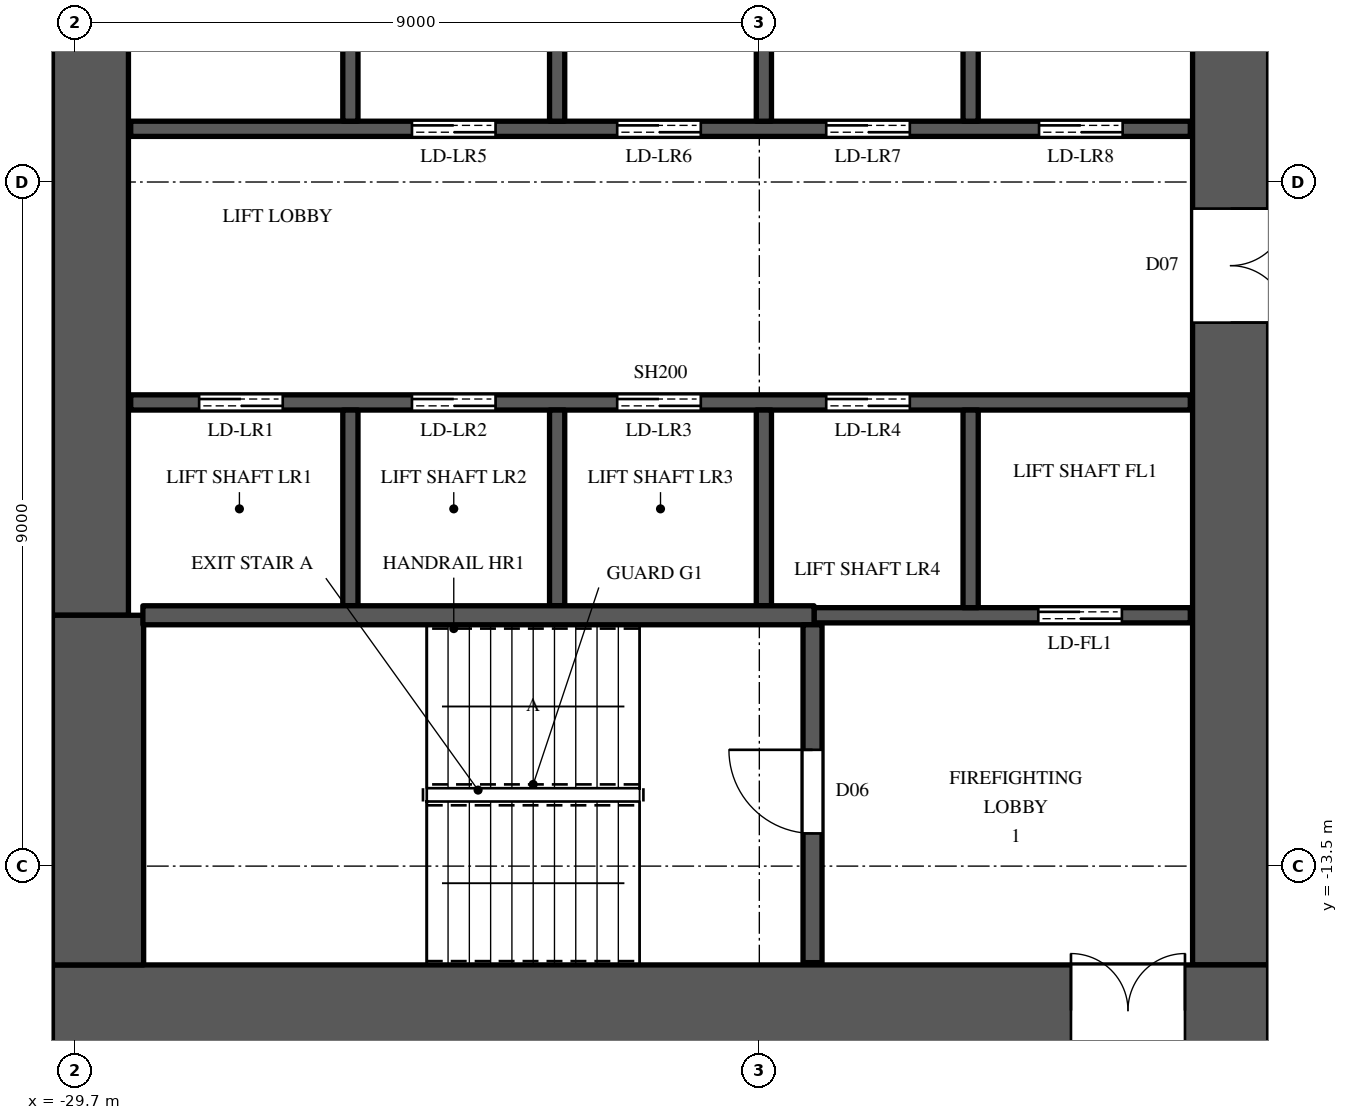
"""IFC4 building model, lengths in metres.
Left out: names, types, materials, properties, quantities, classifications, styles, units other than length and angle.
Written with IfcOpenShell. Run it as: python <this file> out.ifc"""

import sys

from ifc_helpers import new_model, si_unit, direction, frame, frame_2d, origin, place, context, subcontext, project, spatial, rectangle, extrude, element, fill, save


model = new_model("IFC4")
c1 = context("Model", 3, precision=1e-05, world=origin(), true_north=direction((0.0, 1.0)))
c2 = subcontext(c1, "Body", "Model", "MODEL_VIEW")
j1 = project(units=[si_unit("LENGTHUNIT", "METRE"), si_unit("PLANEANGLEUNIT", "RADIAN")], contexts=[c1])
p1 = place(None, origin())
s1 = spatial("IfcSite", under=j1, at=p1, CompositionType="ELEMENT")
p2 = place(p1, origin())
s2 = spatial("IfcBuilding", under=s1, at=p2, CompositionType="ELEMENT")
p3 = place(p2, frame((0.0, 0.0, 66.3)))
s3 = spatial("IfcBuildingStorey", under=s2, at=p3, CompositionType="ELEMENT", Elevation=66.3)
p4 = place(p3, frame((-30.0, -15.4, 0.0), z_axis=(0.0, 0.0, 1.0), x_axis=(1.0, 0.0, 0.0)))
e1 = element("IfcWall", 1, at=p4, inside=s3, PredefinedType="SHEAR", context=c2, shape_type="SweptSolid", body=[
    extrude(rectangle(XDim=16.0, YDim=1.2, at=frame_2d((8.0, 0.0))), origin(), (0.0, 0.0, 1.0), 3.6),
])
p5 = place(p4, frame((13.4, 0.0, 0.0)))
e2 = element("IfcOpeningElement", 2, at=p5, cuts=e1, PredefinedType="OPENING", context=c2, shape_type="SweptSolid", body=[
    extrude(rectangle(XDim=1.5, YDim=2.4, at=frame_2d((0.75, 1.2))), frame((0.0, 0.61, 0.0), z_axis=(0.0, -1.0, 0.0), x_axis=(1.0, 0.0, 0.0)), (0.0, 0.0, 1.0), 1.22),
])
p6 = place(p3, frame((-14.5, -14.8, 0.0), z_axis=(0.0, 0.0, 1.0), x_axis=(0.0, 1.0, 0.0)))
e3 = element("IfcWall", 3, at=p6, inside=s3, PredefinedType="SHEAR", context=c2, shape_type="SweptSolid", body=[
    extrude(rectangle(XDim=29.6, YDim=1.0, at=frame_2d((14.8, 0.0))), origin(), (0.0, 0.0, 1.0), 3.6),
])
p7 = place(p6, frame((8.45, 0.0, 0.0)))
e4 = element("IfcOpeningElement", 4, at=p7, cuts=e3, PredefinedType="OPENING", context=c2, shape_type="SweptSolid", body=[
    extrude(rectangle(XDim=1.5, YDim=2.4, at=frame_2d((0.75, 1.2))), frame((0.0, 0.51, 0.0), z_axis=(0.0, -1.0, 0.0), x_axis=(1.0, 0.0, 0.0)), (0.0, 0.0, 1.0), 1.02),
])
p8 = place(p6, frame((19.65, 0.0, 0.0)))
e5 = element("IfcOpeningElement", 5, at=p8, cuts=e3, PredefinedType="OPENING", context=c2, shape_type="SweptSolid", body=[
    extrude(rectangle(XDim=1.5, YDim=2.4, at=frame_2d((0.75, 1.2))), frame((0.0, 0.51, 0.0), z_axis=(0.0, -1.0, 0.0), x_axis=(1.0, 0.0, 0.0)), (0.0, 0.0, 1.0), 1.02),
])
p9 = place(p6, frame((14.5, 0.0, 0.0)))
e6 = element("IfcOpeningElement", 6, at=p9, cuts=e3, PredefinedType="OPENING", context=c2, shape_type="SweptSolid", body=[
    extrude(rectangle(XDim=0.6, YDim=2.0, at=frame_2d((0.3, 1.0))), frame((0.0, 0.51, 0.0), z_axis=(0.0, -1.0, 0.0), x_axis=(1.0, 0.0, 0.0)), (0.0, 0.0, 1.0), 1.02),
])
p10 = place(p3, frame((-29.5, -10.2, 0.0), z_axis=(0.0, 0.0, 1.0), x_axis=(0.0, 1.0, 0.0)))
e7 = element("IfcWall", 7, at=p10, inside=s3, PredefinedType="SHEAR", context=c2, shape_type="SweptSolid", body=[
    extrude(rectangle(XDim=20.4, YDim=1.0, at=frame_2d((10.2, 0.0))), origin(), (0.0, 0.0, 1.0), 3.6),
])
p11 = place(p3, frame((-29.4, -14.8, 0.0), z_axis=(0.0, 0.0, 1.0), x_axis=(0.0, 1.0, 0.0)))
e8 = element("IfcWall", 8, at=p11, inside=s3, PredefinedType="SHEAR", context=c2, shape_type="SweptSolid", body=[
    extrude(rectangle(XDim=4.6, YDim=1.2, at=frame_2d((2.3, 0.0))), origin(), (0.0, 0.0, 1.0), 3.6),
])
p12 = place(p3, frame((-28.97, -7.4, 0.0), z_axis=(0.0, 0.0, 1.0), x_axis=(1.0, 0.0, 0.0)))
e9 = element("IfcWall", 9, at=p12, inside=s3, PredefinedType="SHEAR", context=c2, shape_type="SweptSolid", body=[
    extrude(rectangle(XDim=13.94, YDim=0.2, at=frame_2d((6.97, 0.0))), origin(), (0.0, 0.0, 1.0), 3.3),
])
p13 = place(p12, frame((0.9, 0.0, 0.0)))
e10 = element("IfcOpeningElement", 10, at=p13, cuts=e9, PredefinedType="OPENING", context=c2, shape_type="SweptSolid", body=[
    extrude(rectangle(XDim=1.1, YDim=2.2, at=frame_2d((0.55, 1.1))), frame((0.0, 0.11, 0.0), z_axis=(0.0, -1.0, 0.0), x_axis=(1.0, 0.0, 0.0)), (0.0, 0.0, 1.0), 0.22),
])
p14 = place(p12, frame((3.7, 0.0, 0.0)))
e11 = element("IfcOpeningElement", 11, at=p14, cuts=e9, PredefinedType="OPENING", context=c2, shape_type="SweptSolid", body=[
    extrude(rectangle(XDim=1.1, YDim=2.2, at=frame_2d((0.55, 1.1))), frame((0.0, 0.11, 0.0), z_axis=(0.0, -1.0, 0.0), x_axis=(1.0, 0.0, 0.0)), (0.0, 0.0, 1.0), 0.22),
])
p15 = place(p12, frame((6.4, 0.0, 0.0)))
e12 = element("IfcOpeningElement", 12, at=p15, cuts=e9, PredefinedType="OPENING", context=c2, shape_type="SweptSolid", body=[
    extrude(rectangle(XDim=1.1, YDim=2.2, at=frame_2d((0.55, 1.1))), frame((0.0, 0.11, 0.0), z_axis=(0.0, -1.0, 0.0), x_axis=(1.0, 0.0, 0.0)), (0.0, 0.0, 1.0), 0.22),
])
p16 = place(p12, frame((9.15, 0.0, 0.0)))
e13 = element("IfcOpeningElement", 13, at=p16, cuts=e9, PredefinedType="OPENING", context=c2, shape_type="SweptSolid", body=[
    extrude(rectangle(XDim=1.1, YDim=2.2, at=frame_2d((0.55, 1.1))), frame((0.0, 0.11, 0.0), z_axis=(0.0, -1.0, 0.0), x_axis=(1.0, 0.0, 0.0)), (0.0, 0.0, 1.0), 0.22),
])
p17 = place(p3, frame((-28.97, -3.8, 0.0), z_axis=(0.0, 0.0, 1.0), x_axis=(1.0, 0.0, 0.0)))
e14 = element("IfcWall", 14, at=p17, inside=s3, PredefinedType="SHEAR", context=c2, shape_type="SweptSolid", body=[
    extrude(rectangle(XDim=13.94, YDim=0.2, at=frame_2d((6.97, 0.0))), origin(), (0.0, 0.0, 1.0), 3.3),
])
p18 = place(p17, frame((3.7, 0.0, 0.0)))
e15 = element("IfcOpeningElement", 15, at=p18, cuts=e14, PredefinedType="OPENING", context=c2, shape_type="SweptSolid", body=[
    extrude(rectangle(XDim=1.1, YDim=2.2, at=frame_2d((0.55, 1.1))), frame((0.0, 0.11, 0.0), z_axis=(0.0, -1.0, 0.0), x_axis=(1.0, 0.0, 0.0)), (0.0, 0.0, 1.0), 0.22),
])
p19 = place(p17, frame((6.4, 0.0, 0.0)))
e16 = element("IfcOpeningElement", 16, at=p19, cuts=e14, PredefinedType="OPENING", context=c2, shape_type="SweptSolid", body=[
    extrude(rectangle(XDim=1.1, YDim=2.2, at=frame_2d((0.55, 1.1))), frame((0.0, 0.11, 0.0), z_axis=(0.0, -1.0, 0.0), x_axis=(1.0, 0.0, 0.0)), (0.0, 0.0, 1.0), 0.22),
])
p20 = place(p17, frame((9.15, 0.0, 0.0)))
e17 = element("IfcOpeningElement", 17, at=p20, cuts=e14, PredefinedType="OPENING", context=c2, shape_type="SweptSolid", body=[
    extrude(rectangle(XDim=1.1, YDim=2.2, at=frame_2d((0.55, 1.1))), frame((0.0, 0.11, 0.0), z_axis=(0.0, -1.0, 0.0), x_axis=(1.0, 0.0, 0.0)), (0.0, 0.0, 1.0), 0.22),
])
p21 = place(p17, frame((11.95, 0.0, 0.0)))
e18 = element("IfcOpeningElement", 18, at=p21, cuts=e14, PredefinedType="OPENING", context=c2, shape_type="SweptSolid", body=[
    extrude(rectangle(XDim=1.1, YDim=2.2, at=frame_2d((0.55, 1.1))), frame((0.0, 0.11, 0.0), z_axis=(0.0, -1.0, 0.0), x_axis=(1.0, 0.0, 0.0)), (0.0, 0.0, 1.0), 0.22),
])
p22 = place(p3, frame((-26.08, -10.075, 0.0), z_axis=(0.0, 0.0, 1.0), x_axis=(0.0, 1.0, 0.0)))
e19 = element("IfcWall", 19, at=p22, inside=s3, PredefinedType="SHEAR", context=c2, shape_type="SweptSolid", body=[
    extrude(rectangle(XDim=2.575, YDim=0.2, at=frame_2d((1.288, 0.0))), origin(), (0.0, 0.0, 1.0), 3.6),
])
p23 = place(p3, frame((-26.08, -3.7, 0.0), z_axis=(0.0, 0.0, 1.0), x_axis=(0.0, 1.0, 0.0)))
e20 = element("IfcWall", 20, at=p23, inside=s3, PredefinedType="SHEAR", context=c2, shape_type="SweptSolid", body=[
    extrude(rectangle(XDim=2.6, YDim=0.2, at=frame_2d((1.3, 0.0))), origin(), (0.0, 0.0, 1.0), 3.6),
])
p24 = place(p3, frame((-23.36, -10.075, 0.0), z_axis=(0.0, 0.0, 1.0), x_axis=(0.0, 1.0, 0.0)))
e21 = element("IfcWall", 21, at=p24, inside=s3, PredefinedType="SHEAR", context=c2, shape_type="SweptSolid", body=[
    extrude(rectangle(XDim=2.575, YDim=0.2, at=frame_2d((1.288, 0.0))), origin(), (0.0, 0.0, 1.0), 3.6),
])
p25 = place(p3, frame((-23.36, -3.7, 0.0), z_axis=(0.0, 0.0, 1.0), x_axis=(0.0, 1.0, 0.0)))
e22 = element("IfcWall", 22, at=p25, inside=s3, PredefinedType="SHEAR", context=c2, shape_type="SweptSolid", body=[
    extrude(rectangle(XDim=2.6, YDim=0.2, at=frame_2d((1.3, 0.0))), origin(), (0.0, 0.0, 1.0), 3.6),
])
p26 = place(p3, frame((-20.64, -10.075, 0.0), z_axis=(0.0, 0.0, 1.0), x_axis=(0.0, 1.0, 0.0)))
e23 = element("IfcWall", 23, at=p26, inside=s3, PredefinedType="SHEAR", context=c2, shape_type="SweptSolid", body=[
    extrude(rectangle(XDim=2.575, YDim=0.2, at=frame_2d((1.288, 0.0))), origin(), (0.0, 0.0, 1.0), 3.6),
])
p27 = place(p3, frame((-20.64, -3.7, 0.0), z_axis=(0.0, 0.0, 1.0), x_axis=(0.0, 1.0, 0.0)))
e24 = element("IfcWall", 24, at=p27, inside=s3, PredefinedType="SHEAR", context=c2, shape_type="SweptSolid", body=[
    extrude(rectangle(XDim=2.6, YDim=0.2, at=frame_2d((1.3, 0.0))), origin(), (0.0, 0.0, 1.0), 3.6),
])
p28 = place(p3, frame((-19.98, -10.2, 0.0), z_axis=(0.0, 0.0, 1.0), x_axis=(1.0, 0.0, 0.0)))
e25 = element("IfcWall", 25, at=p28, inside=s3, PredefinedType="SHEAR", context=c2, shape_type="SweptSolid", body=[
    extrude(rectangle(XDim=4.95, YDim=0.2, at=frame_2d((2.475, 0.0))), origin(), (0.0, 0.0, 1.0), 3.3),
])
p29 = place(p28, frame((2.95, 0.0, 0.0)))
e26 = element("IfcOpeningElement", 26, at=p29, cuts=e25, PredefinedType="OPENING", context=c2, shape_type="SweptSolid", body=[
    extrude(rectangle(XDim=1.1, YDim=2.2, at=frame_2d((0.55, 1.1))), frame((0.0, 0.11, 0.0), z_axis=(0.0, -1.0, 0.0), x_axis=(1.0, 0.0, 0.0)), (0.0, 0.0, 1.0), 0.22),
])
p30 = place(p3, frame((-17.92, -10.1, 0.0), z_axis=(0.0, 0.0, 1.0), x_axis=(0.0, 1.0, 0.0)))
e27 = element("IfcWall", 27, at=p30, inside=s3, PredefinedType="SHEAR", context=c2, shape_type="SweptSolid", body=[
    extrude(rectangle(XDim=2.6, YDim=0.2, at=frame_2d((1.3, 0.0))), origin(), (0.0, 0.0, 1.0), 3.6),
])
p31 = place(p3, frame((-17.92, -3.7, 0.0), z_axis=(0.0, 0.0, 1.0), x_axis=(0.0, 1.0, 0.0)))
e28 = element("IfcWall", 28, at=p31, inside=s3, PredefinedType="SHEAR", context=c2, shape_type="SweptSolid", body=[
    extrude(rectangle(XDim=2.6, YDim=0.2, at=frame_2d((1.3, 0.0))), origin(), (0.0, 0.0, 1.0), 3.6),
])
p32 = place(p3, frame((-28.81, -10.2, 0.0), z_axis=(0.0, 0.0, 1.0), x_axis=(1.0, 0.0, 0.0)))
e29 = element("IfcWall", 29, at=p32, inside=s3, PredefinedType="SHEAR", context=c2, shape_type="SweptSolid", body=[
    extrude(rectangle(XDim=8.83, YDim=0.25, at=frame_2d((4.415, 0.0))), origin(), (0.0, 0.0, 1.0), 3.3),
])
p33 = place(p3, frame((-20.0, -14.77, 0.0), z_axis=(0.0, 0.0, 1.0), x_axis=(0.0, 1.0, 0.0)))
e30 = element("IfcWall", 30, at=p33, inside=s3, PredefinedType="SHEAR", context=c2, shape_type="SweptSolid", body=[
    extrude(rectangle(XDim=4.445, YDim=0.25, at=frame_2d((2.223, 0.0))), origin(), (0.0, 0.0, 1.0), 3.3),
])
p34 = place(p33, frame((1.7, 0.0, 0.0)))
e31 = element("IfcOpeningElement", 31, at=p34, cuts=e30, PredefinedType="OPENING", context=c2, shape_type="SweptSolid", body=[
    extrude(rectangle(XDim=1.1, YDim=2.2, at=frame_2d((0.55, 1.1))), frame((0.0, 0.135, 0.0), z_axis=(0.0, -1.0, 0.0), x_axis=(1.0, 0.0, 0.0)), (0.0, 0.0, 1.0), 0.27),
])
p35 = place(p34, origin())
e32 = element("IfcDoor", 32, at=p35, inside=s3, OperationType="SINGLE_SWING_RIGHT", PredefinedType="DOOR", context=c2, shape_type="SweptSolid", body=[
    extrude(rectangle(XDim=1.1, YDim=2.2, at=frame_2d((0.55, 1.1))), frame((0.0, 0.025, 0.0), z_axis=(0.0, -1.0, 0.0), x_axis=(1.0, 0.0, 0.0)), (0.0, 0.0, 1.0), 0.05),
])
fill(e31, e32)
p36 = place(p13, origin())
e33 = element("IfcDoor", 33, at=p36, inside=s3, OperationType="DOUBLE_DOOR_SLIDING", PredefinedType="DOOR", context=c2, shape_type="SweptSolid", body=[
    extrude(rectangle(XDim=1.1, YDim=2.2, at=frame_2d((0.55, 1.1))), frame((0.0, 0.025, 0.0), z_axis=(0.0, -1.0, 0.0), x_axis=(1.0, 0.0, 0.0)), (0.0, 0.0, 1.0), 0.05),
])
fill(e10, e33)
p37 = place(p14, origin())
e34 = element("IfcDoor", 34, at=p37, inside=s3, OperationType="DOUBLE_DOOR_SLIDING", PredefinedType="DOOR", context=c2, shape_type="SweptSolid", body=[
    extrude(rectangle(XDim=1.1, YDim=2.2, at=frame_2d((0.55, 1.1))), frame((0.0, 0.025, 0.0), z_axis=(0.0, -1.0, 0.0), x_axis=(1.0, 0.0, 0.0)), (0.0, 0.0, 1.0), 0.05),
])
fill(e11, e34)
p38 = place(p15, origin())
e35 = element("IfcDoor", 35, at=p38, inside=s3, OperationType="DOUBLE_DOOR_SLIDING", PredefinedType="DOOR", context=c2, shape_type="SweptSolid", body=[
    extrude(rectangle(XDim=1.1, YDim=2.2, at=frame_2d((0.55, 1.1))), frame((0.0, 0.025, 0.0), z_axis=(0.0, -1.0, 0.0), x_axis=(1.0, 0.0, 0.0)), (0.0, 0.0, 1.0), 0.05),
])
fill(e12, e35)
p39 = place(p16, origin())
e36 = element("IfcDoor", 36, at=p39, inside=s3, OperationType="DOUBLE_DOOR_SLIDING", PredefinedType="DOOR", context=c2, shape_type="SweptSolid", body=[
    extrude(rectangle(XDim=1.1, YDim=2.2, at=frame_2d((0.55, 1.1))), frame((0.0, 0.025, 0.0), z_axis=(0.0, -1.0, 0.0), x_axis=(1.0, 0.0, 0.0)), (0.0, 0.0, 1.0), 0.05),
])
fill(e13, e36)
p40 = place(p29, origin())
e37 = element("IfcDoor", 37, at=p40, inside=s3, OperationType="DOUBLE_DOOR_SLIDING", PredefinedType="DOOR", context=c2, shape_type="SweptSolid", body=[
    extrude(rectangle(XDim=1.1, YDim=2.2, at=frame_2d((0.55, 1.1))), frame((0.0, 0.025, 0.0), z_axis=(0.0, -1.0, 0.0), x_axis=(1.0, 0.0, 0.0)), (0.0, 0.0, 1.0), 0.05),
])
fill(e26, e37)
p41 = place(p18, origin())
e38 = element("IfcDoor", 38, at=p41, inside=s3, OperationType="DOUBLE_DOOR_SLIDING", PredefinedType="DOOR", context=c2, shape_type="SweptSolid", body=[
    extrude(rectangle(XDim=1.1, YDim=2.2, at=frame_2d((0.55, 1.1))), frame((0.0, 0.025, 0.0), z_axis=(0.0, -1.0, 0.0), x_axis=(1.0, 0.0, 0.0)), (0.0, 0.0, 1.0), 0.05),
])
fill(e15, e38)
p42 = place(p19, origin())
e39 = element("IfcDoor", 39, at=p42, inside=s3, OperationType="DOUBLE_DOOR_SLIDING", PredefinedType="DOOR", context=c2, shape_type="SweptSolid", body=[
    extrude(rectangle(XDim=1.1, YDim=2.2, at=frame_2d((0.55, 1.1))), frame((0.0, 0.025, 0.0), z_axis=(0.0, -1.0, 0.0), x_axis=(1.0, 0.0, 0.0)), (0.0, 0.0, 1.0), 0.05),
])
fill(e16, e39)
p43 = place(p20, origin())
e40 = element("IfcDoor", 40, at=p43, inside=s3, OperationType="DOUBLE_DOOR_SLIDING", PredefinedType="DOOR", context=c2, shape_type="SweptSolid", body=[
    extrude(rectangle(XDim=1.1, YDim=2.2, at=frame_2d((0.55, 1.1))), frame((0.0, 0.025, 0.0), z_axis=(0.0, -1.0, 0.0), x_axis=(1.0, 0.0, 0.0)), (0.0, 0.0, 1.0), 0.05),
])
fill(e17, e40)
p44 = place(p21, origin())
e41 = element("IfcDoor", 41, at=p44, inside=s3, OperationType="DOUBLE_DOOR_SLIDING", PredefinedType="DOOR", context=c2, shape_type="SweptSolid", body=[
    extrude(rectangle(XDim=1.1, YDim=2.2, at=frame_2d((0.55, 1.1))), frame((0.0, 0.025, 0.0), z_axis=(0.0, -1.0, 0.0), x_axis=(1.0, 0.0, 0.0)), (0.0, 0.0, 1.0), 0.05),
])
fill(e18, e41)
p45 = place(p5, origin())
e42 = element("IfcDoor", 42, at=p45, inside=s3, OperationType="DOUBLE_DOOR_SINGLE_SWING", PredefinedType="DOOR", context=c2, shape_type="SweptSolid", body=[
    extrude(rectangle(XDim=1.5, YDim=2.4, at=frame_2d((0.75, 1.2))), frame((0.0, 0.025, 0.0), z_axis=(0.0, -1.0, 0.0), x_axis=(1.0, 0.0, 0.0)), (0.0, 0.0, 1.0), 0.05),
])
fill(e2, e42)
p46 = place(p7, origin())
e43 = element("IfcDoor", 43, at=p46, inside=s3, OperationType="DOUBLE_DOOR_SINGLE_SWING", PredefinedType="DOOR", context=c2, shape_type="SweptSolid", body=[
    extrude(rectangle(XDim=1.5, YDim=2.4, at=frame_2d((0.75, 1.2))), frame((0.0, -0.445, 0.0), z_axis=(0.0, -1.0, 0.0), x_axis=(1.0, 0.0, 0.0)), (0.0, 0.0, 1.0), 0.05),
])
fill(e4, e43)
save(model, sys.argv[1])
